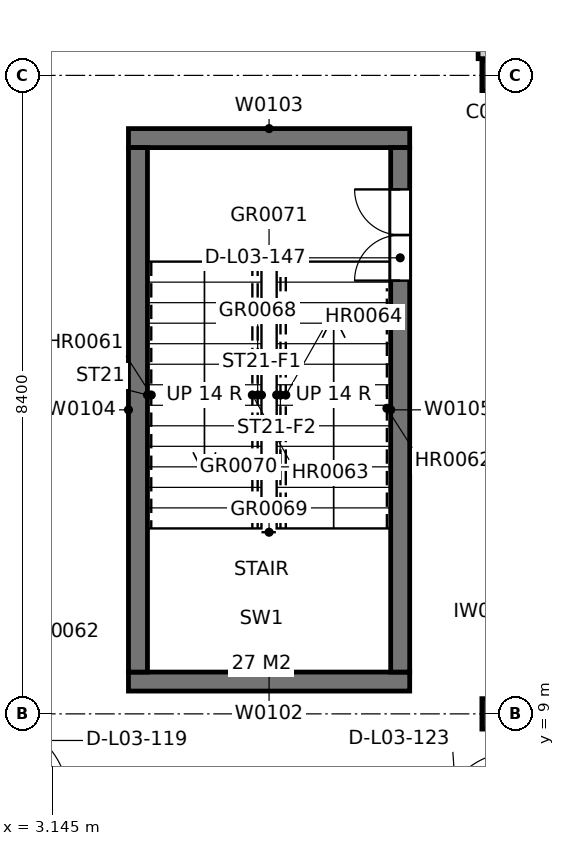
"""IFC4 building model, lengths in metres.
Left out: names, types, materials, properties, quantities, classifications, styles, units other than length and angle.
Written with IfcOpenShell. Run it as: python <this file> out.ifc"""

import sys

from ifc_helpers import new_model, si_unit, direction, frame, frame_2d, origin, origin_2d, place, context, subcontext, project, spatial, rectangle, extrude, element, fill, save


model = new_model("IFC4")
c1 = context("Model", 3, precision=1e-05, world=origin(), true_north=direction((0.0, 1.0)))
c2 = subcontext(c1, "Body", "Model", "MODEL_VIEW")
j1 = project(units=[si_unit("LENGTHUNIT", "METRE"), si_unit("PLANEANGLEUNIT", "RADIAN")], contexts=[c1])
p1 = place(None, origin())
s1 = spatial("IfcSite", under=j1, at=p1, CompositionType="ELEMENT")
p2 = place(p1, origin())
s2 = spatial("IfcBuilding", under=s1, at=p2, CompositionType="ELEMENT")
p3 = place(p2, frame((0.0, 0.0, 14.4)))
s3 = spatial("IfcBuildingStorey", under=s2, at=p3, CompositionType="ELEMENT", Elevation=14.4)
for number, where, z_axis, x_axis in (
    (1, (9.0, 9.0, 0.0), (0.0, 0.0, 1.0), (1.0, 0.0, 0.0)),
    (2, (9.0, 17.4, 0.0), (0.0, 0.0, 1.0), (1.0, 0.0, 0.0)),
):
    element("IfcColumn", number, at=place(p3, frame(where, z_axis=z_axis, x_axis=x_axis)), inside=s3, PredefinedType="COLUMN", context=c2, shape_type="SweptSolid", body=[
        extrude(rectangle(XDim=0.4, YDim=0.4, at=origin_2d()), origin(), (0.0, 0.0, 1.0), 4.8),
    ])
for number, where, z_axis, x_axis in (
    (3, (4.15, 9.425, 0.0), (0.0, 0.0, 1.0), (1.0, 0.0, 0.0)),
    (4, (4.15, 16.575, 0.0), (0.0, 0.0, 1.0), (1.0, 0.0, 0.0)),
):
    element("IfcWall", number, at=place(p3, frame(where, z_axis=z_axis, x_axis=x_axis)), inside=s3, PredefinedType="SOLIDWALL", context=c2, shape_type="SweptSolid", body=[
        extrude(rectangle(XDim=3.7, YDim=0.25, at=frame_2d((1.85, 0.0))), origin(), (0.0, 0.0, 1.0), 4.8),
    ])
p4 = place(p3, frame((4.275, 9.55, 0.0), z_axis=(0.0, 0.0, 1.0), x_axis=(0.0, 1.0, 0.0)))
e5 = element("IfcWall", 5, at=p4, inside=s3, PredefinedType="SOLIDWALL", context=c2, shape_type="SweptSolid", body=[
    extrude(rectangle(XDim=6.9, YDim=0.25, at=frame_2d((3.45, 0.0))), origin(), (0.0, 0.0, 1.0), 4.8),
])
p5 = place(p3, frame((7.725, 9.55, 0.0), z_axis=(0.0, 0.0, 1.0), x_axis=(0.0, 1.0, 0.0)))
e6 = element("IfcWall", 6, at=p5, inside=s3, PredefinedType="SOLIDWALL", context=c2, shape_type="SweptSolid", body=[
    extrude(rectangle(XDim=6.9, YDim=0.25, at=frame_2d((3.45, 0.0))), origin(), (0.0, 0.0, 1.0), 4.8),
])
p6 = place(p5, frame((5.15, 0.0, 0.0)))
e7 = element("IfcOpeningElement", 7, at=p6, cuts=e6, PredefinedType="OPENING", context=c2, shape_type="SweptSolid", body=[
    extrude(rectangle(XDim=1.2, YDim=2.1, at=frame_2d((0.6, 1.05))), frame((0.0, 0.135, 0.0), z_axis=(0.0, -1.0, 0.0), x_axis=(1.0, 0.0, 0.0)), (0.0, 0.0, 1.0), 0.27),
])
p7 = place(p3, frame((8.81, 18.562, 0.0), z_axis=(0.0, 0.0, 1.0), x_axis=(0.003370476059, -0.999994319929, 0.0)))
e8 = element("IfcWall", 8, at=p7, inside=s3, PredefinedType="PARTITIONING", context=c2, shape_type="SweptSolid", body=[
    extrude(rectangle(XDim=0.942, YDim=0.125, at=frame_2d((0.471, 0.0))), origin(), (0.0, 0.0, 1.0), 3.86),
])
p8 = place(p6, origin())
e9 = element("IfcDoor", 9, at=p8, inside=s3, OperationType="DOUBLE_DOOR_SINGLE_SWING", PredefinedType="DOOR", context=c2, shape_type="SweptSolid", body=[
    extrude(rectangle(XDim=1.2, YDim=2.1, at=frame_2d((0.6, 1.05))), frame((0.0, 0.025, 0.0), z_axis=(0.0, -1.0, 0.0), x_axis=(1.0, 0.0, 0.0)), (0.0, 0.0, 1.0), 0.05),
])
fill(e7, e9)
save(model, sys.argv[1])
